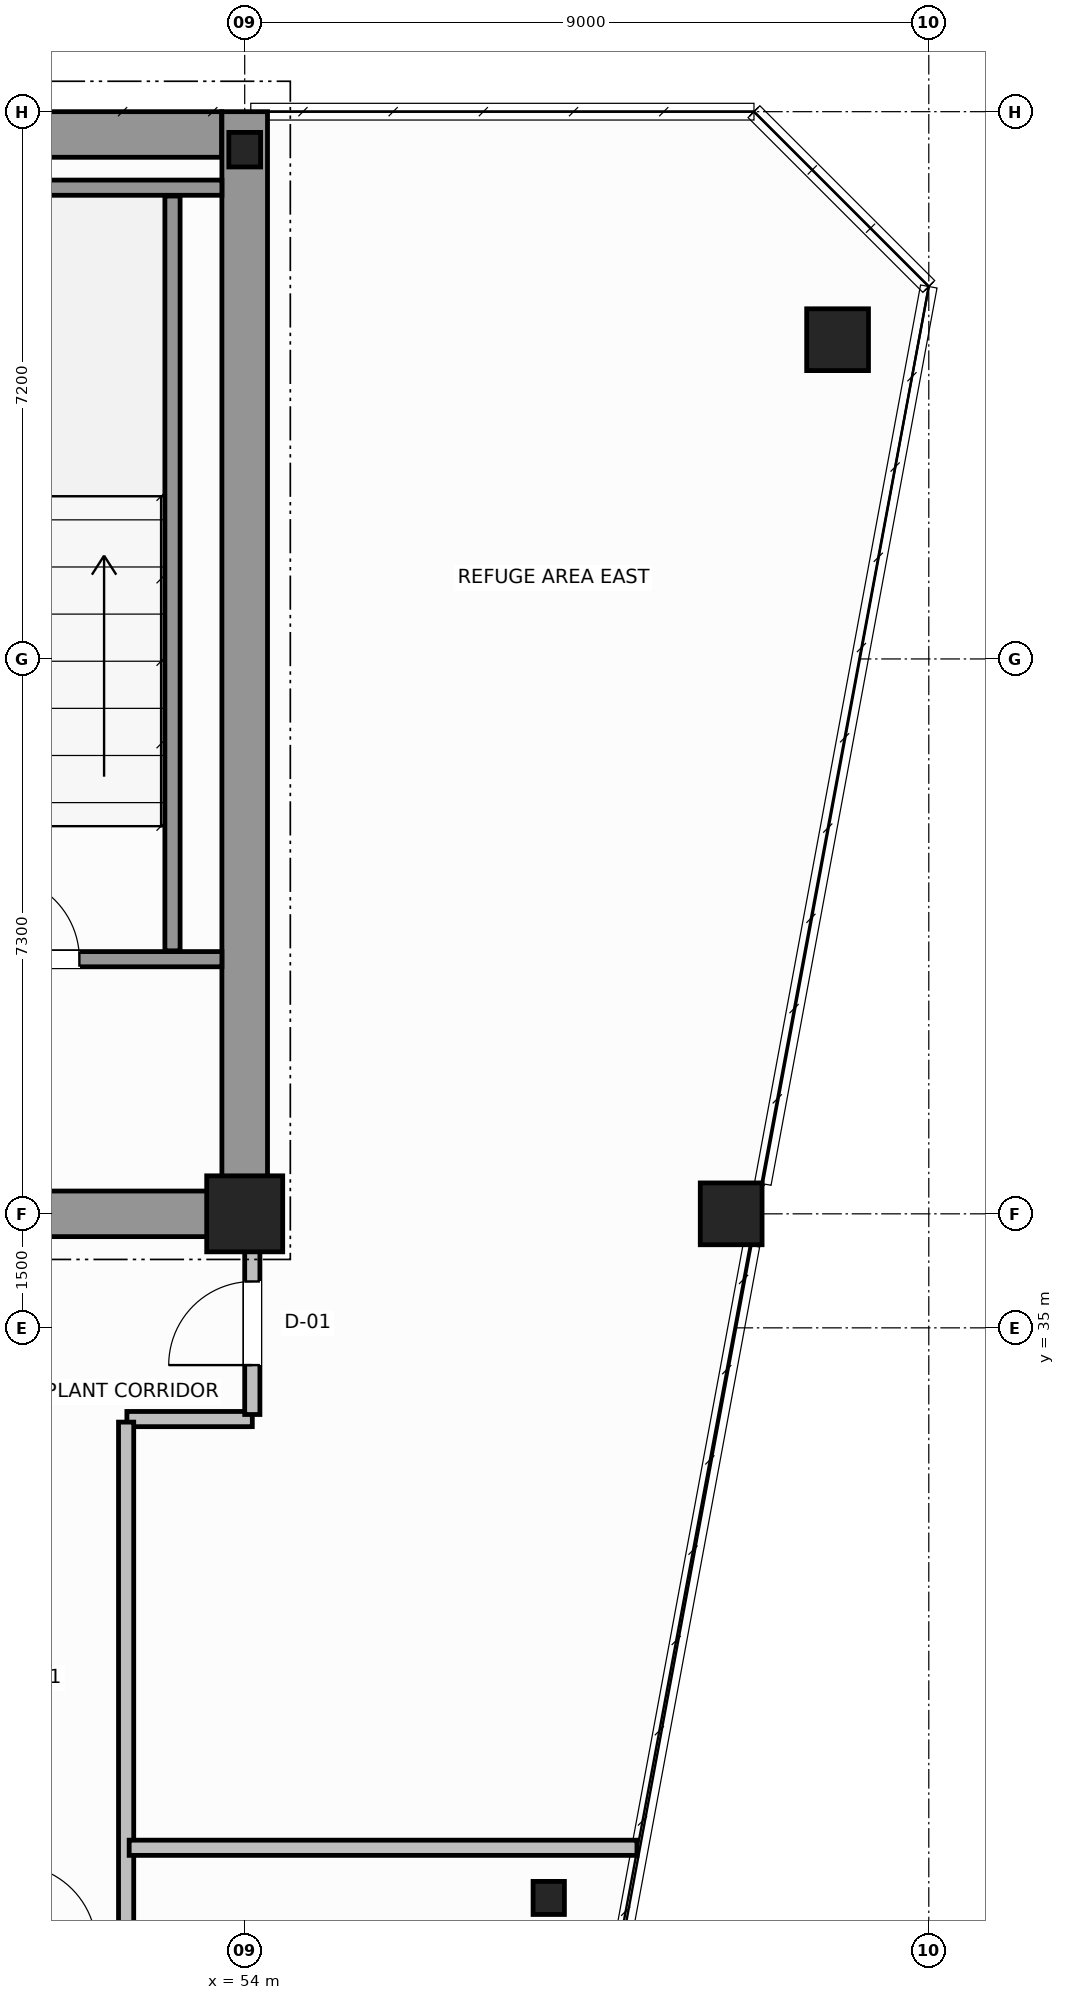
"""IFC4 building model, lengths in metres.
Left out: names, types, materials, properties, quantities, classifications, styles, units other than length and angle.
Written with IfcOpenShell. Run it as: python <this file> out.ifc"""

import sys

from ifc_helpers import new_model, si_unit, direction, frame, frame_2d, origin, origin_2d, place, context, subcontext, project, spatial, rectangle, hollow_circle, i_section, extrude, source, transform, mapped, element, fill, save


model = new_model("IFC4")
c1 = context("Model", 3, precision=1e-05, world=origin(), true_north=direction((0.0, 1.0)))
c2 = subcontext(c1, "Body", "Model", "MODEL_VIEW")
j1 = project(units=[si_unit("LENGTHUNIT", "METRE"), si_unit("PLANEANGLEUNIT", "RADIAN")], contexts=[c1])
p1 = place(None, origin())
s1 = spatial("IfcSite", under=j1, at=p1, CompositionType="ELEMENT")
p2 = place(p1, origin())
s2 = spatial("IfcBuilding", under=s1, at=p2, CompositionType="ELEMENT")
p3 = place(p2, frame((0.0, 0.0, 218.4)))
s3 = spatial("IfcBuildingStorey", under=s2, at=p3, CompositionType="ELEMENT", Elevation=218.4)
m1 = source(origin(), c2, "Body", "SweptSolid", [
    extrude(rectangle(XDim=1.0, YDim=1.0, at=origin_2d()), origin(), (0.0, 0.0, 1.0), 4.8),
])
p4 = place(p3, frame((54.0, 36.5, 0.0), z_axis=(0.0, 0.0, 1.0), x_axis=(1.0, 0.0, 0.0)))
e1 = element("IfcColumn", 1, at=p4, inside=s3, PredefinedType="COLUMN", context=c2, shape_type="MappedRepresentation", body=[
    mapped(m1, transform((0.0, 0.0, 0.0), scale=1.0)),
])
m2 = source(origin(), c2, "Body", "SweptSolid", [
    extrude(i_section(OverallWidth=0.418, OverallDepth=0.455, WebThickness=0.042, FlangeThickness=0.058, FilletRadius=0.015, at=origin_2d()), origin(), (0.0, 0.0, 1.0), 4.8),
])
p5 = place(p3, frame((54.0, 50.5, 0.0), z_axis=(0.0, 0.0, 1.0), x_axis=(1.0, 0.0, 0.0)))
e2 = element("IfcColumn", 2, at=p5, inside=s3, PredefinedType="COLUMN", context=c2, shape_type="MappedRepresentation", body=[
    mapped(m2, transform((0.0, 0.0, 0.0), scale=1.0)),
])
m3 = source(origin(), c2, "Body", "SweptSolid", [
    extrude(hollow_circle(Radius=0.406, WallThickness=0.04, at=origin_2d()), origin(), (0.0, 0.0, 1.0), 4.8),
])
for number, where, z_axis, x_axis in (
    (3, (61.8, 48.0, 0.0), (0.0, 0.0, 1.0), (1.0, 0.0, 0.0)),
    (4, (60.4, 36.5, 0.0), (0.0, 0.0, 1.0), (1.0, 0.0, 0.0)),
):
    element("IfcColumn", number, at=place(p3, frame(where, z_axis=z_axis, x_axis=x_axis)), inside=s3, PredefinedType="COLUMN", context=c2, shape_type="MappedRepresentation", body=[
        mapped(m3, transform((0.0, 0.0, 0.0), scale=1.0)),
    ])
m4 = source(origin(), c2, "Body", "SweptSolid", [
    extrude(i_section(OverallWidth=0.412, OverallDepth=0.435, WebThickness=0.036, FlangeThickness=0.05, FilletRadius=0.015, at=origin_2d()), origin(), (0.0, 0.0, 1.0), 4.8),
])
p6 = place(p3, frame((58.0, 27.5, 0.0), z_axis=(0.0, 0.0, 1.0), x_axis=(1.0, 0.0, 0.0)))
e5 = element("IfcColumn", 5, at=p6, inside=s3, PredefinedType="COLUMN", context=c2, shape_type="MappedRepresentation", body=[
    mapped(m4, transform((0.0, 0.0, 0.0), scale=1.0)),
])
p7 = place(p3, frame((34.002, 50.7, 0.0), z_axis=(0.0, 0.0, 1.0), x_axis=(1.0, 0.0, 0.0)))
e6 = element("IfcWall", 6, at=p7, inside=s3, PredefinedType="SHEAR", context=c2, shape_type="SweptSolid", body=[
    extrude(rectangle(XDim=19.694, YDim=0.6, at=frame_2d((9.847, 0.0))), origin(), (0.0, 0.0, 1.0), 4.8),
])
p8 = place(p3, frame((54.0, 36.5, 0.0), z_axis=(0.0, 0.0, 1.0), x_axis=(0.0, 1.0, 0.0)))
e7 = element("IfcWall", 7, at=p8, inside=s3, PredefinedType="SHEAR", context=c2, shape_type="SweptSolid", body=[
    extrude(rectangle(XDim=14.5, YDim=0.6, at=frame_2d((7.25, 0.0))), origin(), (0.0, 0.0, 1.0), 4.8),
])
p9 = place(p3, frame((49.8, 36.5, 0.0), z_axis=(0.0, 0.0, 1.0), x_axis=(1.0, 0.0, 0.0)))
e8 = element("IfcWall", 8, at=p9, inside=s3, PredefinedType="SHEAR", context=c2, shape_type="SweptSolid", body=[
    extrude(rectangle(XDim=3.88, YDim=0.6, at=frame_2d((1.94, 0.0))), origin(), (0.0, 0.0, 1.0), 3.54),
])
p10 = place(p3, frame((49.4, 39.85, 0.0), z_axis=(0.0, 0.0, 1.0), x_axis=(1.0, 0.0, 0.0)))
e9 = element("IfcWall", 9, at=p10, inside=s3, PredefinedType="SOLIDWALL", context=c2, shape_type="SweptSolid", body=[
    extrude(rectangle(XDim=4.3, YDim=0.2, at=frame_2d((2.15, 0.0))), origin(), (0.0, 0.0, 1.0), 4.8),
])
p11 = place(p10, frame((1.325, 0.0, 0.0)))
e10 = element("IfcOpeningElement", 10, at=p11, cuts=e9, PredefinedType="OPENING", context=c2, shape_type="SweptSolid", body=[
    extrude(rectangle(XDim=1.1, YDim=2.15, at=frame_2d((0.55, 1.075))), frame((0.0, 0.11, 0.0), z_axis=(0.0, -1.0, 0.0), x_axis=(1.0, 0.0, 0.0)), (0.0, 0.0, 1.0), 0.22),
])
p12 = place(p3, frame((49.4, 50.0, 0.0), z_axis=(0.0, 0.0, 1.0), x_axis=(1.0, 0.0, 0.0)))
e11 = element("IfcWall", 11, at=p12, inside=s3, PredefinedType="SOLIDWALL", context=c2, shape_type="SweptSolid", body=[
    extrude(rectangle(XDim=4.3, YDim=0.2, at=frame_2d((2.15, 0.0))), origin(), (0.0, 0.0, 1.0), 4.8),
])
p13 = place(p3, frame((53.05, 39.96, 0.0), z_axis=(0.0, 0.0, 1.0), x_axis=(0.0, 1.0, 0.0)))
e12 = element("IfcWall", 12, at=p13, inside=s3, PredefinedType="SOLIDWALL", context=c2, shape_type="SweptSolid", body=[
    extrude(rectangle(XDim=9.93, YDim=0.2, at=frame_2d((4.965, 0.0))), origin(), (0.0, 0.0, 1.0), 4.8),
])
p14 = place(p3, frame((52.45, 33.8, 0.0), z_axis=(0.0, 0.0, 1.0), x_axis=(1.0, 0.0, 0.0)))
e13 = element("IfcWall", 13, at=p14, inside=s3, PredefinedType="SOLIDWALL", context=c2, shape_type="SweptSolid", body=[
    extrude(rectangle(XDim=1.65, YDim=0.2, at=frame_2d((0.825, 0.0))), origin(), (0.0, 0.0, 1.0), 4.13),
])
p15 = place(p3, frame((54.1, 33.86, 0.0), z_axis=(0.0, 0.0, 1.0), x_axis=(0.0, 1.0, 0.0)))
e14 = element("IfcWall", 14, at=p15, inside=s3, PredefinedType="SOLIDWALL", context=c2, shape_type="SweptSolid", body=[
    extrude(rectangle(XDim=2.58, YDim=0.2, at=frame_2d((1.29, 0.0))), origin(), (0.0, 0.0, 1.0), 4.54),
])
p16 = place(p15, frame((0.65, 0.0, 0.0)))
e15 = element("IfcOpeningElement", 15, at=p16, cuts=e14, PredefinedType="OPENING", context=c2, shape_type="SweptSolid", body=[
    extrude(rectangle(XDim=1.1, YDim=2.15, at=frame_2d((0.55, 1.075))), frame((0.0, 0.11, 0.0), z_axis=(0.0, -1.0, 0.0), x_axis=(1.0, 0.0, 0.0)), (0.0, 0.0, 1.0), 0.22),
])
p17 = place(p3, frame((52.44, 26.84, 0.0), z_axis=(0.0, 0.0, 1.0), x_axis=(0.0, 1.0, 0.0)))
e16 = element("IfcWall", 16, at=p17, inside=s3, PredefinedType="SOLIDWALL", context=c2, shape_type="SweptSolid", body=[
    extrude(rectangle(XDim=6.92, YDim=0.2, at=frame_2d((3.46, 0.0))), origin(), (0.0, 0.0, 1.0), 4.54),
])
p18 = place(p3, frame((52.48, 28.16, 0.0), z_axis=(0.0, 0.0, 1.0), x_axis=(1.0, 0.0, 0.0)))
e17 = element("IfcWall", 17, at=p18, inside=s3, PredefinedType="SOLIDWALL", context=c2, shape_type="SweptSolid", body=[
    extrude(rectangle(XDim=6.681, YDim=0.2, at=frame_2d((3.34, 0.0))), origin(), (0.0, 0.0, 1.0), 4.54),
])
m5 = source(origin(), c2, "Body", "SweptSolid", [
    extrude(rectangle(XDim=1.1, YDim=2.15, at=frame_2d((0.55, 1.075))), frame((0.0, 0.025, 0.0), z_axis=(0.0, -1.0, 0.0), x_axis=(1.0, 0.0, 0.0)), (0.0, 0.0, 1.0), 0.05),
])
p19 = place(p11, origin())
e18 = element("IfcDoor", 18, at=p19, inside=s3, OperationType="SINGLE_SWING_RIGHT", PredefinedType="DOOR", context=c2, shape_type="MappedRepresentation", body=[
    mapped(m5, transform((0.0, 0.0, 0.0), scale=1.0)),
])
fill(e10, e18)
p20 = place(p16, origin())
e19 = element("IfcDoor", 19, at=p20, inside=s3, OperationType="SINGLE_SWING_RIGHT", PredefinedType="DOOR", context=c2, shape_type="MappedRepresentation", body=[
    mapped(m5, transform((0.0, 0.0, 0.0), scale=1.0)),
])
fill(e15, e19)
save(model, sys.argv[1])
